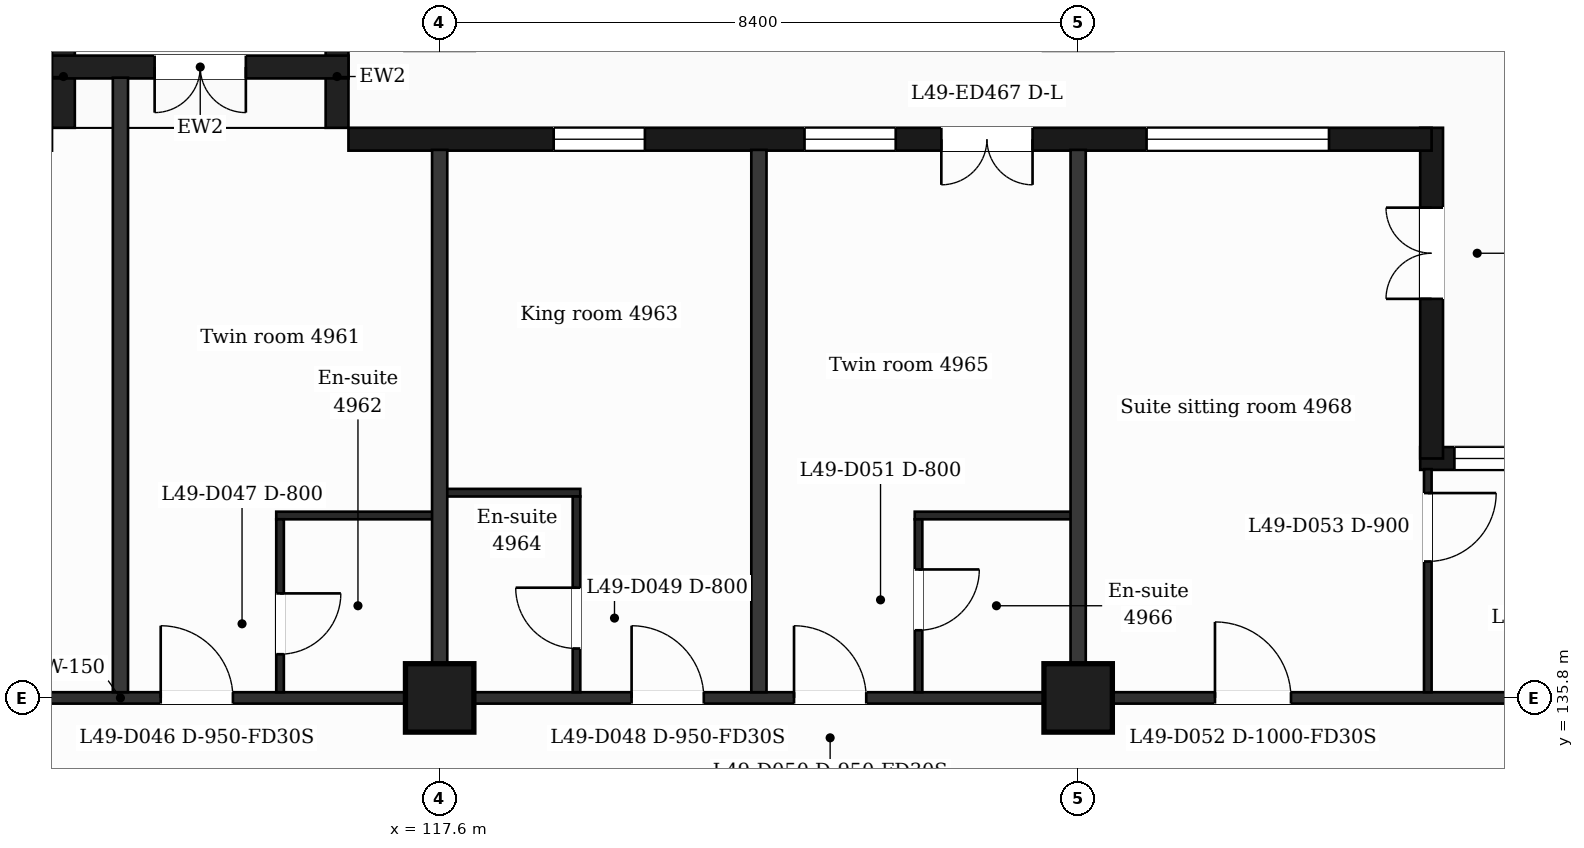
"""IFC4 building model, lengths in metres.
Left out: names, types, materials, properties, quantities, classifications, styles, units other than length and angle.
Written with IfcOpenShell. Run it as: python <this file> out.ifc"""

import sys

from ifc_helpers import new_model, si_unit, direction, frame, frame_2d, origin, origin_2d, place, context, subcontext, project, spatial, rectangle, extrude, element, fill, save


model = new_model("IFC4")
c1 = context("Model", 3, precision=1e-05, world=origin(), true_north=direction((0.0, 1.0)))
c2 = subcontext(c1, "Body", "Model", "MODEL_VIEW")
j1 = project(units=[si_unit("LENGTHUNIT", "METRE"), si_unit("PLANEANGLEUNIT", "RADIAN")], contexts=[c1])
p1 = place(None, origin())
s1 = spatial("IfcSite", under=j1, at=p1, CompositionType="ELEMENT")
p2 = place(p1, origin())
s2 = spatial("IfcBuilding", under=s1, at=p2, CompositionType="ELEMENT")
p3 = place(p2, frame((0.0, 0.0, 205.9)))
s3 = spatial("IfcBuildingStorey", under=s2, at=p3, CompositionType="ELEMENT", Elevation=205.9)
for number, where, z_axis, x_axis in (
    (1, (117.6, 135.8, 0.0), (0.0, 0.0, 1.0), (1.0, 0.0, 0.0)),
    (2, (126.0, 135.8, 0.0), (0.0, 0.0, 1.0), (1.0, 0.0, 0.0)),
):
    element("IfcColumn", number, at=place(p3, frame(where, z_axis=z_axis, x_axis=x_axis)), inside=s3, PredefinedType="COLUMN", context=c2, shape_type="SweptSolid", body=[
        extrude(rectangle(XDim=0.9, YDim=0.9, at=origin_2d()), origin(), (0.0, 0.0, 1.0), 3.7),
    ])
p4 = place(p3, frame((135.623, 138.95, 0.0), z_axis=(0.0, 0.0, 1.0), x_axis=(-1.0, 0.0, 0.0)))
e3 = element("IfcWall", 3, at=p4, inside=s3, PredefinedType="SOLIDWALL", context=c2, shape_type="SweptSolid", body=[
    extrude(rectangle(XDim=5.123, YDim=0.3, at=frame_2d((2.561, 0.0))), origin(), (0.0, 0.0, 1.0), 3.38),
])
p5 = place(p4, frame((1.673, 0.0, 0.9)))
e4 = element("IfcOpeningElement", 4, at=p5, cuts=e3, PredefinedType="OPENING", context=c2, shape_type="SweptSolid", body=[
    extrude(rectangle(XDim=1.2, YDim=2.1, at=frame_2d((0.6, 1.05))), frame((0.0, 0.16, 0.0), z_axis=(0.0, -1.0, 0.0), x_axis=(1.0, 0.0, 0.0)), (0.0, 0.0, 1.0), 0.32),
])
p6 = place(p4, frame((3.473, 0.0, 0.9)))
e5 = element("IfcOpeningElement", 5, at=p6, cuts=e3, PredefinedType="OPENING", context=c2, shape_type="SweptSolid", body=[
    extrude(rectangle(XDim=1.2, YDim=2.1, at=frame_2d((0.6, 1.05))), frame((0.0, 0.16, 0.0), z_axis=(0.0, -1.0, 0.0), x_axis=(1.0, 0.0, 0.0)), (0.0, 0.0, 1.0), 0.32),
])
p7 = place(p3, frame((130.65, 138.95, 0.0), z_axis=(0.0, 0.0, 1.0), x_axis=(0.0, 1.0, 0.0)))
e6 = element("IfcWall", 6, at=p7, inside=s3, PredefinedType="SOLIDWALL", context=c2, shape_type="SweptSolid", body=[
    extrude(rectangle(XDim=4.35, YDim=0.3, at=frame_2d((2.175, 0.0))), origin(), (0.0, 0.0, 1.0), 3.38),
])
p8 = place(p7, frame((2.1, 0.0, 0.0)))
e7 = element("IfcOpeningElement", 7, at=p8, cuts=e6, PredefinedType="OPENING", context=c2, shape_type="SweptSolid", body=[
    extrude(rectangle(XDim=1.2, YDim=2.4, at=frame_2d((0.6, 1.2))), frame((0.0, 0.16, 0.0), z_axis=(0.0, -1.0, 0.0), x_axis=(1.0, 0.0, 0.0)), (0.0, 0.0, 1.0), 0.32),
])
p9 = place(p3, frame((130.65, 143.15, 0.0), z_axis=(0.0, 0.0, 1.0), x_axis=(-1.0, 0.0, 0.0)))
e8 = element("IfcWall", 8, at=p9, inside=s3, PredefinedType="SOLIDWALL", context=c2, shape_type="SweptSolid", body=[
    extrude(rectangle(XDim=14.25, YDim=0.3, at=frame_2d((7.125, 0.0))), origin(), (0.0, 0.0, 1.0), 3.38),
])
p10 = place(p9, frame((1.35, 0.0, 0.9)))
e9 = element("IfcOpeningElement", 9, at=p10, cuts=e8, PredefinedType="OPENING", context=c2, shape_type="SweptSolid", body=[
    extrude(rectangle(XDim=2.4, YDim=2.1, at=frame_2d((1.2, 1.05))), frame((0.0, 0.16, 0.0), z_axis=(0.0, -1.0, 0.0), x_axis=(1.0, 0.0, 0.0)), (0.0, 0.0, 1.0), 0.32),
])
p11 = place(p9, frame((5.25, 0.0, 0.0)))
e10 = element("IfcOpeningElement", 10, at=p11, cuts=e8, PredefinedType="OPENING", context=c2, shape_type="SweptSolid", body=[
    extrude(rectangle(XDim=1.2, YDim=2.4, at=frame_2d((0.6, 1.2))), frame((0.0, 0.16, 0.0), z_axis=(0.0, -1.0, 0.0), x_axis=(1.0, 0.0, 0.0)), (0.0, 0.0, 1.0), 0.32),
])
p12 = place(p9, frame((7.05, 0.0, 0.9)))
e11 = element("IfcOpeningElement", 11, at=p12, cuts=e8, PredefinedType="OPENING", context=c2, shape_type="SweptSolid", body=[
    extrude(rectangle(XDim=1.2, YDim=2.1, at=frame_2d((0.6, 1.05))), frame((0.0, 0.16, 0.0), z_axis=(0.0, -1.0, 0.0), x_axis=(1.0, 0.0, 0.0)), (0.0, 0.0, 1.0), 0.32),
])
p13 = place(p9, frame((10.35, 0.0, 0.9)))
e12 = element("IfcOpeningElement", 12, at=p13, cuts=e8, PredefinedType="OPENING", context=c2, shape_type="SweptSolid", body=[
    extrude(rectangle(XDim=1.2, YDim=2.1, at=frame_2d((0.6, 1.05))), frame((0.0, 0.16, 0.0), z_axis=(0.0, -1.0, 0.0), x_axis=(1.0, 0.0, 0.0)), (0.0, 0.0, 1.0), 0.32),
])
for number, where, z_axis, x_axis in (
    (13, (116.25, 143.3, 0.0), (0.0, 0.0, 1.0), (0.0, 1.0, 0.0)),
    (14, (112.65, 143.3, 0.0), (0.0, 0.0, 1.0), (0.0, 1.0, 0.0)),
):
    element("IfcWall", number, at=place(p3, frame(where, z_axis=z_axis, x_axis=x_axis)), inside=s3, PredefinedType="SOLIDWALL", context=c2, shape_type="SweptSolid", body=[
        extrude(rectangle(XDim=1.35, YDim=0.3, at=frame_2d((0.675, 0.0))), origin(), (0.0, 0.0, 1.0), 3.38),
    ])
p14 = place(p3, frame((116.4, 144.1, 0.0), z_axis=(0.0, 0.0, 1.0), x_axis=(-1.0, 0.0, 0.0)))
e15 = element("IfcWall", 15, at=p14, inside=s3, PredefinedType="SOLIDWALL", context=c2, shape_type="SweptSolid", body=[
    extrude(rectangle(XDim=3.9, YDim=0.3, at=frame_2d((1.95, 0.0))), origin(), (0.0, 0.0, 1.0), 3.38),
])
p15 = place(p14, frame((1.35, 0.0, 0.0)))
e16 = element("IfcOpeningElement", 16, at=p15, cuts=e15, PredefinedType="OPENING", context=c2, shape_type="SweptSolid", body=[
    extrude(rectangle(XDim=1.2, YDim=2.4, at=frame_2d((0.6, 1.2))), frame((0.0, 0.16, 0.0), z_axis=(0.0, -1.0, 0.0), x_axis=(1.0, 0.0, 0.0)), (0.0, 0.0, 1.0), 0.32),
])
p16 = place(p3, frame((90.895, 135.8, 0.0), z_axis=(0.0, 0.0, 1.0), x_axis=(1.0, 0.0, 0.0)))
e17 = element("IfcWall", 17, at=p16, inside=s3, PredefinedType="PARTITIONING", context=c2, shape_type="SweptSolid", body=[
    extrude(rectangle(XDim=45.011, YDim=0.15, at=frame_2d((22.505, 0.0))), origin(), (0.0, 0.0, 1.0), 3.38),
])
p17 = place(p16, frame((7.675, 0.0, 0.0)))
e18 = element("IfcOpeningElement", 18, at=p17, cuts=e17, PredefinedType="OPENING", context=c2, shape_type="SweptSolid", body=[
    extrude(rectangle(XDim=1.0, YDim=2.1, at=frame_2d((0.5, 1.05))), frame((0.0, 0.085, 0.0), z_axis=(0.0, -1.0, 0.0), x_axis=(1.0, 0.0, 0.0)), (0.0, 0.0, 1.0), 0.17),
])
p18 = place(p16, frame((10.575, 0.0, 0.0)))
e19 = element("IfcOpeningElement", 19, at=p18, cuts=e17, PredefinedType="OPENING", context=c2, shape_type="SweptSolid", body=[
    extrude(rectangle(XDim=0.95, YDim=2.1, at=frame_2d((0.475, 1.05))), frame((0.0, 0.085, 0.0), z_axis=(0.0, -1.0, 0.0), x_axis=(1.0, 0.0, 0.0)), (0.0, 0.0, 1.0), 0.17),
])
p19 = place(p16, frame((18.979, 0.0, 0.0)))
e20 = element("IfcOpeningElement", 20, at=p19, cuts=e17, PredefinedType="OPENING", context=c2, shape_type="SweptSolid", body=[
    extrude(rectangle(XDim=0.95, YDim=2.1, at=frame_2d((0.475, 1.05))), frame((0.0, 0.085, 0.0), z_axis=(0.0, -1.0, 0.0), x_axis=(1.0, 0.0, 0.0)), (0.0, 0.0, 1.0), 0.17),
])
p20 = place(p16, frame((23.035, 0.0, 0.0)))
e21 = element("IfcOpeningElement", 21, at=p20, cuts=e17, PredefinedType="OPENING", context=c2, shape_type="SweptSolid", body=[
    extrude(rectangle(XDim=0.95, YDim=2.1, at=frame_2d((0.475, 1.05))), frame((0.0, 0.085, 0.0), z_axis=(0.0, -1.0, 0.0), x_axis=(1.0, 0.0, 0.0)), (0.0, 0.0, 1.0), 0.17),
])
p21 = place(p16, frame((29.23, 0.0, 0.0)))
e22 = element("IfcOpeningElement", 22, at=p21, cuts=e17, PredefinedType="OPENING", context=c2, shape_type="SweptSolid", body=[
    extrude(rectangle(XDim=0.95, YDim=2.1, at=frame_2d((0.475, 1.05))), frame((0.0, 0.085, 0.0), z_axis=(0.0, -1.0, 0.0), x_axis=(1.0, 0.0, 0.0)), (0.0, 0.0, 1.0), 0.17),
])
p22 = place(p16, frame((31.367, 0.0, 0.0)))
e23 = element("IfcOpeningElement", 23, at=p22, cuts=e17, PredefinedType="OPENING", context=c2, shape_type="SweptSolid", body=[
    extrude(rectangle(XDim=0.95, YDim=2.1, at=frame_2d((0.475, 1.05))), frame((0.0, 0.085, 0.0), z_axis=(0.0, -1.0, 0.0), x_axis=(1.0, 0.0, 0.0)), (0.0, 0.0, 1.0), 0.17),
])
p23 = place(p16, frame((36.906, 0.0, 0.0)))
e24 = element("IfcOpeningElement", 24, at=p23, cuts=e17, PredefinedType="OPENING", context=c2, shape_type="SweptSolid", body=[
    extrude(rectangle(XDim=1.0, YDim=2.1, at=frame_2d((0.5, 1.05))), frame((0.0, 0.085, 0.0), z_axis=(0.0, -1.0, 0.0), x_axis=(1.0, 0.0, 0.0)), (0.0, 0.0, 1.0), 0.17),
])
p24 = place(p3, frame((115.45, 138.2, 0.0), z_axis=(0.0, 0.0, 1.0), x_axis=(1.0, 0.0, 0.0)))
e25 = element("IfcWall", 25, at=p24, inside=s3, PredefinedType="PARTITIONING", context=c2, shape_type="SweptSolid", body=[
    extrude(rectangle(XDim=2.15, YDim=0.1, at=frame_2d((1.075, 0.0))), origin(), (0.0, 0.0, 1.0), 3.38),
])
p25 = place(p3, frame((123.85, 138.2, 0.0), z_axis=(0.0, 0.0, 1.0), x_axis=(1.0, 0.0, 0.0)))
e26 = element("IfcWall", 26, at=p25, inside=s3, PredefinedType="PARTITIONING", context=c2, shape_type="SweptSolid", body=[
    extrude(rectangle(XDim=2.15, YDim=0.1, at=frame_2d((1.075, 0.0))), origin(), (0.0, 0.0, 1.0), 3.38),
])
p26 = place(p3, frame((117.6, 138.5, 0.0), z_axis=(0.0, 0.0, 1.0), x_axis=(1.0, 0.0, 0.0)))
e27 = element("IfcWall", 27, at=p26, inside=s3, PredefinedType="PARTITIONING", context=c2, shape_type="SweptSolid", body=[
    extrude(rectangle(XDim=1.85, YDim=0.1, at=frame_2d((0.925, 0.0))), origin(), (0.0, 0.0, 1.0), 3.38),
])
p27 = place(p3, frame((113.4, 135.875, 0.0), z_axis=(0.0, 0.0, 1.0), x_axis=(0.0, 1.0, 0.0)))
e28 = element("IfcWall", 28, at=p27, inside=s3, PredefinedType="PARTITIONING", context=c2, shape_type="SweptSolid", body=[
    extrude(rectangle(XDim=8.085, YDim=0.2, at=frame_2d((4.042, 0.0))), origin(), (0.0, 0.0, 1.0), 3.38),
])
p28 = place(p3, frame((115.5, 135.875, 0.0), z_axis=(0.0, 0.0, 1.0), x_axis=(0.0, 1.0, 0.0)))
e29 = element("IfcWall", 29, at=p28, inside=s3, PredefinedType="PARTITIONING", context=c2, shape_type="SweptSolid", body=[
    extrude(rectangle(XDim=2.275, YDim=0.1, at=frame_2d((1.137, 0.0))), origin(), (0.0, 0.0, 1.0), 3.38),
])
p29 = place(p28, frame((0.5, 0.0, 0.0)))
e30 = element("IfcOpeningElement", 30, at=p29, cuts=e29, PredefinedType="OPENING", context=c2, shape_type="SweptSolid", body=[
    extrude(rectangle(XDim=0.8, YDim=2.1, at=frame_2d((0.4, 1.05))), frame((0.0, 0.06, 0.0), z_axis=(0.0, -1.0, 0.0), x_axis=(1.0, 0.0, 0.0)), (0.0, 0.0, 1.0), 0.12),
])
p30 = place(p3, frame((117.6, 135.875, 0.0), z_axis=(0.0, 0.0, 1.0), x_axis=(0.0, 1.0, 0.0)))
e31 = element("IfcWall", 31, at=p30, inside=s3, PredefinedType="PARTITIONING", context=c2, shape_type="SweptSolid", body=[
    extrude(rectangle(XDim=7.135, YDim=0.2, at=frame_2d((3.567, 0.0))), origin(), (0.0, 0.0, 1.0), 3.38),
])
p31 = place(p3, frame((119.4, 135.875, 0.0), z_axis=(0.0, 0.0, 1.0), x_axis=(0.0, 1.0, 0.0)))
e32 = element("IfcWall", 32, at=p31, inside=s3, PredefinedType="PARTITIONING", context=c2, shape_type="SweptSolid", body=[
    extrude(rectangle(XDim=2.575, YDim=0.1, at=frame_2d((1.288, 0.0))), origin(), (0.0, 0.0, 1.0), 3.38),
])
p32 = place(p31, frame((0.575, 0.0, 0.0)))
e33 = element("IfcOpeningElement", 33, at=p32, cuts=e32, PredefinedType="OPENING", context=c2, shape_type="SweptSolid", body=[
    extrude(rectangle(XDim=0.8, YDim=2.1, at=frame_2d((0.4, 1.05))), frame((0.0, 0.06, 0.0), z_axis=(0.0, -1.0, 0.0), x_axis=(1.0, 0.0, 0.0)), (0.0, 0.0, 1.0), 0.12),
])
p33 = place(p3, frame((121.8, 135.875, 0.0), z_axis=(0.0, 0.0, 1.0), x_axis=(0.0, 1.0, 0.0)))
e34 = element("IfcWall", 34, at=p33, inside=s3, PredefinedType="PARTITIONING", context=c2, shape_type="SweptSolid", body=[
    extrude(rectangle(XDim=7.135, YDim=0.2, at=frame_2d((3.567, 0.0))), origin(), (0.0, 0.0, 1.0), 3.38),
])
p34 = place(p3, frame((123.9, 135.875, 0.0), z_axis=(0.0, 0.0, 1.0), x_axis=(0.0, 1.0, 0.0)))
e35 = element("IfcWall", 35, at=p34, inside=s3, PredefinedType="PARTITIONING", context=c2, shape_type="SweptSolid", body=[
    extrude(rectangle(XDim=2.275, YDim=0.1, at=frame_2d((1.137, 0.0))), origin(), (0.0, 0.0, 1.0), 3.38),
])
p35 = place(p34, frame((0.815, 0.0, 0.0)))
e36 = element("IfcOpeningElement", 36, at=p35, cuts=e35, PredefinedType="OPENING", context=c2, shape_type="SweptSolid", body=[
    extrude(rectangle(XDim=0.8, YDim=2.1, at=frame_2d((0.4, 1.05))), frame((0.0, 0.06, 0.0), z_axis=(0.0, -1.0, 0.0), x_axis=(1.0, 0.0, 0.0)), (0.0, 0.0, 1.0), 0.12),
])
p36 = place(p3, frame((126.0, 135.875, 0.0), z_axis=(0.0, 0.0, 1.0), x_axis=(0.0, 1.0, 0.0)))
e37 = element("IfcWall", 37, at=p36, inside=s3, PredefinedType="PARTITIONING", context=c2, shape_type="SweptSolid", body=[
    extrude(rectangle(XDim=7.135, YDim=0.2, at=frame_2d((3.567, 0.0))), origin(), (0.0, 0.0, 1.0), 3.38),
])
p37 = place(p3, frame((130.6, 135.875, 0.0), z_axis=(0.0, 0.0, 1.0), x_axis=(0.0, 1.0, 0.0)))
e38 = element("IfcWall", 38, at=p37, inside=s3, PredefinedType="PARTITIONING", context=c2, shape_type="SweptSolid", body=[
    extrude(rectangle(XDim=2.935, YDim=0.1, at=frame_2d((1.468, 0.0))), origin(), (0.0, 0.0, 1.0), 3.38),
])
p38 = place(p37, frame((1.72, 0.0, 0.0)))
e39 = element("IfcOpeningElement", 39, at=p38, cuts=e38, PredefinedType="OPENING", context=c2, shape_type="SweptSolid", body=[
    extrude(rectangle(XDim=0.9, YDim=2.1, at=frame_2d((0.45, 1.05))), frame((0.0, 0.06, 0.0), z_axis=(0.0, -1.0, 0.0), x_axis=(1.0, 0.0, 0.0)), (0.0, 0.0, 1.0), 0.12),
])
p39 = place(p6, origin())
e40 = element("IfcWindow", 40, at=p39, inside=s3, PartitioningType="SINGLE_PANEL", PredefinedType="WINDOW", context=c2, shape_type="SweptSolid", body=[
    extrude(rectangle(XDim=1.2, YDim=2.1, at=frame_2d((0.6, 1.05))), frame((0.0, 0.03, 0.0), z_axis=(0.0, -1.0, 0.0), x_axis=(1.0, 0.0, 0.0)), (0.0, 0.0, 1.0), 0.06),
])
fill(e5, e40)
p40 = place(p8, origin())
e41 = element("IfcDoor", 41, at=p40, inside=s3, OperationType="DOUBLE_DOOR_SINGLE_SWING", PredefinedType="DOOR", context=c2, shape_type="SweptSolid", body=[
    extrude(rectangle(XDim=1.2, YDim=2.4, at=frame_2d((0.6, 1.2))), frame((0.0, 0.025, 0.0), z_axis=(0.0, -1.0, 0.0), x_axis=(1.0, 0.0, 0.0)), (0.0, 0.0, 1.0), 0.05),
])
fill(e7, e41)
p41 = place(p10, origin())
e42 = element("IfcWindow", 42, at=p41, inside=s3, PartitioningType="SINGLE_PANEL", PredefinedType="WINDOW", context=c2, shape_type="SweptSolid", body=[
    extrude(rectangle(XDim=2.4, YDim=2.1, at=frame_2d((1.2, 1.05))), frame((0.0, 0.03, 0.0), z_axis=(0.0, -1.0, 0.0), x_axis=(1.0, 0.0, 0.0)), (0.0, 0.0, 1.0), 0.06),
])
fill(e9, e42)
p42 = place(p11, origin())
e43 = element("IfcDoor", 43, at=p42, inside=s3, OperationType="DOUBLE_DOOR_SINGLE_SWING", PredefinedType="DOOR", context=c2, shape_type="SweptSolid", body=[
    extrude(rectangle(XDim=1.2, YDim=2.4, at=frame_2d((0.6, 1.2))), frame((0.0, 0.025, 0.0), z_axis=(0.0, -1.0, 0.0), x_axis=(1.0, 0.0, 0.0)), (0.0, 0.0, 1.0), 0.05),
])
fill(e10, e43)
p43 = place(p12, origin())
e44 = element("IfcWindow", 44, at=p43, inside=s3, PartitioningType="SINGLE_PANEL", PredefinedType="WINDOW", context=c2, shape_type="SweptSolid", body=[
    extrude(rectangle(XDim=1.2, YDim=2.1, at=frame_2d((0.6, 1.05))), frame((0.0, 0.03, 0.0), z_axis=(0.0, -1.0, 0.0), x_axis=(1.0, 0.0, 0.0)), (0.0, 0.0, 1.0), 0.06),
])
fill(e11, e44)
p44 = place(p13, origin())
e45 = element("IfcWindow", 45, at=p44, inside=s3, PartitioningType="SINGLE_PANEL", PredefinedType="WINDOW", context=c2, shape_type="SweptSolid", body=[
    extrude(rectangle(XDim=1.2, YDim=2.1, at=frame_2d((0.6, 1.05))), frame((0.0, 0.03, 0.0), z_axis=(0.0, -1.0, 0.0), x_axis=(1.0, 0.0, 0.0)), (0.0, 0.0, 1.0), 0.06),
])
fill(e12, e45)
p45 = place(p15, origin())
e46 = element("IfcDoor", 46, at=p45, inside=s3, OperationType="DOUBLE_DOOR_SINGLE_SWING", PredefinedType="DOOR", context=c2, shape_type="SweptSolid", body=[
    extrude(rectangle(XDim=1.2, YDim=2.4, at=frame_2d((0.6, 1.2))), frame((0.0, 0.025, 0.0), z_axis=(0.0, -1.0, 0.0), x_axis=(1.0, 0.0, 0.0)), (0.0, 0.0, 1.0), 0.05),
])
fill(e16, e46)
p46 = place(p20, origin())
e47 = element("IfcDoor", 47, at=p46, inside=s3, OperationType="SINGLE_SWING_LEFT", PredefinedType="DOOR", context=c2, shape_type="SweptSolid", body=[
    extrude(rectangle(XDim=0.95, YDim=2.1, at=frame_2d((0.475, 1.05))), frame((0.0, 0.025, 0.0), z_axis=(0.0, -1.0, 0.0), x_axis=(1.0, 0.0, 0.0)), (0.0, 0.0, 1.0), 0.05),
])
fill(e21, e47)
p47 = place(p29, origin())
e48 = element("IfcDoor", 48, at=p47, inside=s3, OperationType="SINGLE_SWING_RIGHT", PredefinedType="DOOR", context=c2, shape_type="SweptSolid", body=[
    extrude(rectangle(XDim=0.8, YDim=2.1, at=frame_2d((0.4, 1.05))), frame((0.0, 0.025, 0.0), z_axis=(0.0, -1.0, 0.0), x_axis=(1.0, 0.0, 0.0)), (0.0, 0.0, 1.0), 0.05),
])
fill(e30, e48)
p48 = place(p21, origin())
e49 = element("IfcDoor", 49, at=p48, inside=s3, OperationType="SINGLE_SWING_LEFT", PredefinedType="DOOR", context=c2, shape_type="SweptSolid", body=[
    extrude(rectangle(XDim=0.95, YDim=2.1, at=frame_2d((0.475, 1.05))), frame((0.0, 0.025, 0.0), z_axis=(0.0, -1.0, 0.0), x_axis=(1.0, 0.0, 0.0)), (0.0, 0.0, 1.0), 0.05),
])
fill(e22, e49)
p49 = place(p32, origin())
e50 = element("IfcDoor", 50, at=p49, inside=s3, OperationType="SINGLE_SWING_RIGHT", PredefinedType="DOOR", context=c2, shape_type="SweptSolid", body=[
    extrude(rectangle(XDim=0.8, YDim=2.1, at=frame_2d((0.4, 1.05))), frame((0.0, 0.025, 0.0), z_axis=(0.0, -1.0, 0.0), x_axis=(1.0, 0.0, 0.0)), (0.0, 0.0, 1.0), 0.05),
])
fill(e33, e50)
p50 = place(p22, origin())
e51 = element("IfcDoor", 51, at=p50, inside=s3, OperationType="SINGLE_SWING_LEFT", PredefinedType="DOOR", context=c2, shape_type="SweptSolid", body=[
    extrude(rectangle(XDim=0.95, YDim=2.1, at=frame_2d((0.475, 1.05))), frame((0.0, 0.025, 0.0), z_axis=(0.0, -1.0, 0.0), x_axis=(1.0, 0.0, 0.0)), (0.0, 0.0, 1.0), 0.05),
])
fill(e23, e51)
p51 = place(p35, origin())
e52 = element("IfcDoor", 52, at=p51, inside=s3, OperationType="SINGLE_SWING_RIGHT", PredefinedType="DOOR", context=c2, shape_type="SweptSolid", body=[
    extrude(rectangle(XDim=0.8, YDim=2.1, at=frame_2d((0.4, 1.05))), frame((0.0, 0.025, 0.0), z_axis=(0.0, -1.0, 0.0), x_axis=(1.0, 0.0, 0.0)), (0.0, 0.0, 1.0), 0.05),
])
fill(e36, e52)
p52 = place(p23, origin())
e53 = element("IfcDoor", 53, at=p52, inside=s3, OperationType="SINGLE_SWING_LEFT", PredefinedType="DOOR", context=c2, shape_type="SweptSolid", body=[
    extrude(rectangle(XDim=1.0, YDim=2.1, at=frame_2d((0.5, 1.05))), frame((0.0, 0.025, 0.0), z_axis=(0.0, -1.0, 0.0), x_axis=(1.0, 0.0, 0.0)), (0.0, 0.0, 1.0), 0.05),
])
fill(e24, e53)
p53 = place(p38, origin())
e54 = element("IfcDoor", 54, at=p53, inside=s3, OperationType="SINGLE_SWING_RIGHT", PredefinedType="DOOR", context=c2, shape_type="SweptSolid", body=[
    extrude(rectangle(XDim=0.9, YDim=2.1, at=frame_2d((0.45, 1.05))), frame((0.0, 0.025, 0.0), z_axis=(0.0, -1.0, 0.0), x_axis=(1.0, 0.0, 0.0)), (0.0, 0.0, 1.0), 0.05),
])
fill(e39, e54)
save(model, sys.argv[1])
